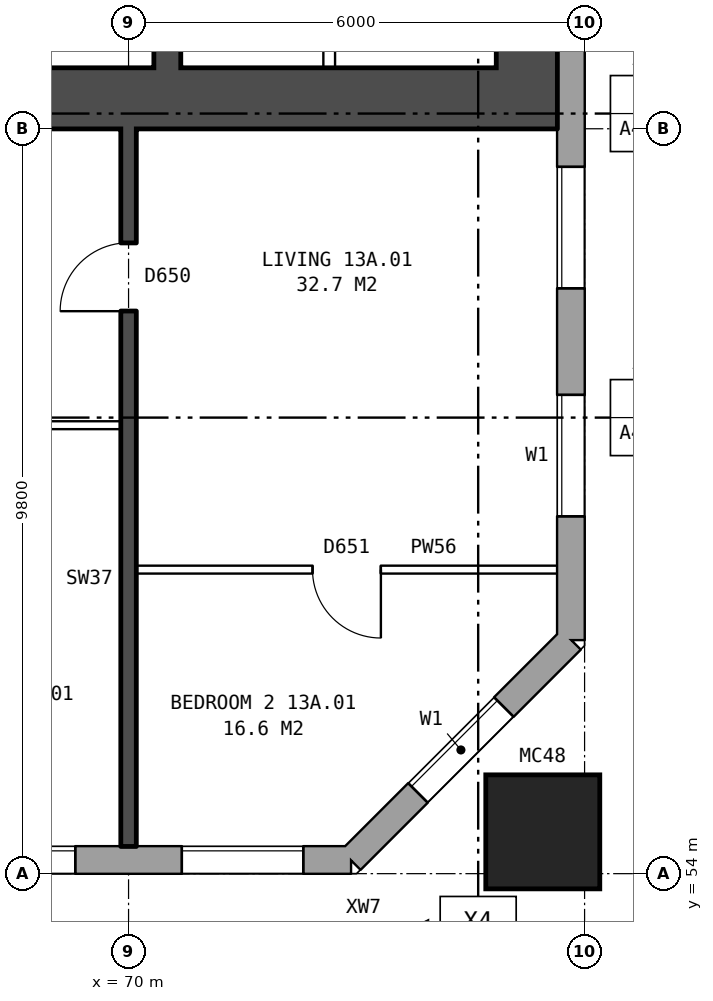
"""IFC4 building model, lengths in metres.
Left out: names, types, materials, properties, quantities, classifications, styles, units other than length and angle.
Written with IfcOpenShell. Run it as: python <this file> out.ifc"""

import sys

from ifc_helpers import new_model, si_unit, direction, frame, frame_2d, origin, origin_2d, place, context, subcontext, project, spatial, rectangle, hollow_rectangle, extrude, element, fill, save


model = new_model("IFC4")
c1 = context("Model", 3, precision=1e-05, world=origin(), true_north=direction((0.0, 1.0)))
c2 = subcontext(c1, "Body", "Model", "MODEL_VIEW")
j1 = project(units=[si_unit("LENGTHUNIT", "METRE"), si_unit("PLANEANGLEUNIT", "RADIAN")], contexts=[c1])
p1 = place(None, origin())
s1 = spatial("IfcSite", under=j1, at=p1, CompositionType="ELEMENT")
p2 = place(p1, origin())
s2 = spatial("IfcBuilding", under=s1, at=p2, CompositionType="ELEMENT")
p3 = place(p2, frame((0.0, 0.0, 50.5)))
s3 = spatial("IfcBuildingStorey", under=s2, at=p3, CompositionType="ELEMENT", Elevation=50.5)
p4 = place(p3, frame((75.45, 54.55, 0.0), z_axis=(0.0, 0.0, 1.0), x_axis=(1.0, 0.0, 0.0)))
e1 = element("IfcColumn", 1, at=p4, inside=s3, PredefinedType="COLUMN", context=c2, shape_type="SweptSolid", body=[
    extrude(hollow_rectangle(XDim=1.5, YDim=1.5, WallThickness=0.08, at=origin_2d()), origin(), (0.0, 0.0, 1.0), 3.1),
])
p5 = place(p3, frame((24.575, 54.18, 0.0), z_axis=(0.0, 0.0, 1.0), x_axis=(1.0, 0.0, 0.0)))
e2 = element("IfcWall", 2, at=p5, inside=s3, PredefinedType="STANDARD", context=c2, shape_type="SweptSolid", body=[
    extrude(rectangle(XDim=48.351, YDim=0.36, at=frame_2d((24.175, 0.0))), origin(), (0.0, 0.0, 1.0), 2.85),
])
p6 = place(p5, frame((1.125, 0.0, 0.8)))
e3 = element("IfcOpeningElement", 3, at=p6, cuts=e2, PredefinedType="OPENING", context=c2, shape_type="SweptSolid", body=[
    extrude(rectangle(XDim=1.6, YDim=1.8, at=frame_2d((0.8, 0.9))), frame((0.0, 0.19, 0.0), z_axis=(0.0, -1.0, 0.0), x_axis=(1.0, 0.0, 0.0)), (0.0, 0.0, 1.0), 0.38),
])
p7 = place(p5, frame((4.125, 0.0, 0.8)))
e4 = element("IfcOpeningElement", 4, at=p7, cuts=e2, PredefinedType="OPENING", context=c2, shape_type="SweptSolid", body=[
    extrude(rectangle(XDim=1.6, YDim=1.8, at=frame_2d((0.8, 0.9))), frame((0.0, 0.19, 0.0), z_axis=(0.0, -1.0, 0.0), x_axis=(1.0, 0.0, 0.0)), (0.0, 0.0, 1.0), 0.38),
])
p8 = place(p5, frame((6.025, 0.0, 0.8)))
e5 = element("IfcOpeningElement", 5, at=p8, cuts=e2, PredefinedType="OPENING", context=c2, shape_type="SweptSolid", body=[
    extrude(rectangle(XDim=1.0, YDim=1.8, at=frame_2d((0.5, 0.9))), frame((0.0, 0.19, 0.0), z_axis=(0.0, -1.0, 0.0), x_axis=(1.0, 0.0, 0.0)), (0.0, 0.0, 1.0), 0.38),
])
p9 = place(p5, frame((9.775, 0.0, 0.8)))
e6 = element("IfcOpeningElement", 6, at=p9, cuts=e2, PredefinedType="OPENING", context=c2, shape_type="SweptSolid", body=[
    extrude(rectangle(XDim=1.0, YDim=0.9, at=frame_2d((0.5, 0.45))), frame((0.0, 0.19, 0.0), z_axis=(0.0, -1.0, 0.0), x_axis=(1.0, 0.0, 0.0)), (0.0, 0.0, 1.0), 0.38),
])
p10 = place(p5, frame((13.125, 0.0, 0.8)))
e7 = element("IfcOpeningElement", 7, at=p10, cuts=e2, PredefinedType="OPENING", context=c2, shape_type="SweptSolid", body=[
    extrude(rectangle(XDim=1.6, YDim=1.8, at=frame_2d((0.8, 0.9))), frame((0.0, 0.19, 0.0), z_axis=(0.0, -1.0, 0.0), x_axis=(1.0, 0.0, 0.0)), (0.0, 0.0, 1.0), 0.38),
])
p11 = place(p5, frame((16.125, 0.0, 0.8)))
e8 = element("IfcOpeningElement", 8, at=p11, cuts=e2, PredefinedType="OPENING", context=c2, shape_type="SweptSolid", body=[
    extrude(rectangle(XDim=1.6, YDim=1.8, at=frame_2d((0.8, 0.9))), frame((0.0, 0.19, 0.0), z_axis=(0.0, -1.0, 0.0), x_axis=(1.0, 0.0, 0.0)), (0.0, 0.0, 1.0), 0.38),
])
p12 = place(p5, frame((19.125, 0.0, 0.8)))
e9 = element("IfcOpeningElement", 9, at=p12, cuts=e2, PredefinedType="OPENING", context=c2, shape_type="SweptSolid", body=[
    extrude(rectangle(XDim=1.6, YDim=1.8, at=frame_2d((0.8, 0.9))), frame((0.0, 0.19, 0.0), z_axis=(0.0, -1.0, 0.0), x_axis=(1.0, 0.0, 0.0)), (0.0, 0.0, 1.0), 0.38),
])
p13 = place(p5, frame((22.125, 0.0, 0.8)))
e10 = element("IfcOpeningElement", 10, at=p13, cuts=e2, PredefinedType="OPENING", context=c2, shape_type="SweptSolid", body=[
    extrude(rectangle(XDim=1.6, YDim=1.8, at=frame_2d((0.8, 0.9))), frame((0.0, 0.19, 0.0), z_axis=(0.0, -1.0, 0.0), x_axis=(1.0, 0.0, 0.0)), (0.0, 0.0, 1.0), 0.38),
])
p14 = place(p5, frame((25.125, 0.0, 0.8)))
e11 = element("IfcOpeningElement", 11, at=p14, cuts=e2, PredefinedType="OPENING", context=c2, shape_type="SweptSolid", body=[
    extrude(rectangle(XDim=1.6, YDim=1.8, at=frame_2d((0.8, 0.9))), frame((0.0, 0.19, 0.0), z_axis=(0.0, -1.0, 0.0), x_axis=(1.0, 0.0, 0.0)), (0.0, 0.0, 1.0), 0.38),
])
p15 = place(p5, frame((28.125, 0.0, 0.8)))
e12 = element("IfcOpeningElement", 12, at=p15, cuts=e2, PredefinedType="OPENING", context=c2, shape_type="SweptSolid", body=[
    extrude(rectangle(XDim=1.6, YDim=1.8, at=frame_2d((0.8, 0.9))), frame((0.0, 0.19, 0.0), z_axis=(0.0, -1.0, 0.0), x_axis=(1.0, 0.0, 0.0)), (0.0, 0.0, 1.0), 0.38),
])
p16 = place(p5, frame((31.125, 0.0, 0.8)))
e13 = element("IfcOpeningElement", 13, at=p16, cuts=e2, PredefinedType="OPENING", context=c2, shape_type="SweptSolid", body=[
    extrude(rectangle(XDim=1.6, YDim=1.8, at=frame_2d((0.8, 0.9))), frame((0.0, 0.19, 0.0), z_axis=(0.0, -1.0, 0.0), x_axis=(1.0, 0.0, 0.0)), (0.0, 0.0, 1.0), 0.38),
])
p17 = place(p5, frame((34.125, 0.0, 0.8)))
e14 = element("IfcOpeningElement", 14, at=p17, cuts=e2, PredefinedType="OPENING", context=c2, shape_type="SweptSolid", body=[
    extrude(rectangle(XDim=1.6, YDim=1.8, at=frame_2d((0.8, 0.9))), frame((0.0, 0.19, 0.0), z_axis=(0.0, -1.0, 0.0), x_axis=(1.0, 0.0, 0.0)), (0.0, 0.0, 1.0), 0.38),
])
p18 = place(p5, frame((36.575, 0.0, 0.45)))
e15 = element("IfcOpeningElement", 15, at=p18, cuts=e2, PredefinedType="OPENING", context=c2, shape_type="SweptSolid", body=[
    extrude(rectangle(XDim=1.2, YDim=1.8, at=frame_2d((0.6, 0.9))), frame((0.0, 0.19, 0.0), z_axis=(0.0, -1.0, 0.0), x_axis=(1.0, 0.0, 0.0)), (0.0, 0.0, 1.0), 0.38),
])
p19 = place(p5, frame((39.975, 0.0, 1.7)))
e16 = element("IfcOpeningElement", 16, at=p19, cuts=e2, PredefinedType="OPENING", context=c2, shape_type="SweptSolid", body=[
    extrude(rectangle(XDim=1.0, YDim=0.9, at=frame_2d((0.5, 0.45))), frame((0.0, 0.19, 0.0), z_axis=(0.0, -1.0, 0.0), x_axis=(1.0, 0.0, 0.0)), (0.0, 0.0, 1.0), 0.38),
])
p20 = place(p5, frame((43.125, 0.0, 0.8)))
e17 = element("IfcOpeningElement", 17, at=p20, cuts=e2, PredefinedType="OPENING", context=c2, shape_type="SweptSolid", body=[
    extrude(rectangle(XDim=1.6, YDim=1.8, at=frame_2d((0.8, 0.9))), frame((0.0, 0.19, 0.0), z_axis=(0.0, -1.0, 0.0), x_axis=(1.0, 0.0, 0.0)), (0.0, 0.0, 1.0), 0.38),
])
p21 = place(p5, frame((46.125, 0.0, 0.8)))
e18 = element("IfcOpeningElement", 18, at=p21, cuts=e2, PredefinedType="OPENING", context=c2, shape_type="SweptSolid", body=[
    extrude(rectangle(XDim=1.6, YDim=1.8, at=frame_2d((0.8, 0.9))), frame((0.0, 0.19, 0.0), z_axis=(0.0, -1.0, 0.0), x_axis=(1.0, 0.0, 0.0)), (0.0, 0.0, 1.0), 0.38),
])
p22 = place(p5, frame((7.325, 0.0, 1.7)))
e19 = element("IfcOpeningElement", 19, at=p22, cuts=e2, PredefinedType="OPENING", context=c2, shape_type="SweptSolid", body=[
    extrude(rectangle(XDim=1.0, YDim=0.9, at=frame_2d((0.5, 0.45))), frame((0.0, 0.19, 0.0), z_axis=(0.0, -1.0, 0.0), x_axis=(1.0, 0.0, 0.0)), (0.0, 0.0, 1.0), 0.38),
])
p23 = place(p5, frame((11.075, 0.0, 0.8)))
e20 = element("IfcOpeningElement", 20, at=p23, cuts=e2, PredefinedType="OPENING", context=c2, shape_type="SweptSolid", body=[
    extrude(rectangle(XDim=1.0, YDim=1.8, at=frame_2d((0.5, 0.9))), frame((0.0, 0.19, 0.0), z_axis=(0.0, -1.0, 0.0), x_axis=(1.0, 0.0, 0.0)), (0.0, 0.0, 1.0), 0.38),
])
p24 = place(p5, frame((38.075, 0.0, 0.45)))
e21 = element("IfcOpeningElement", 21, at=p24, cuts=e2, PredefinedType="OPENING", context=c2, shape_type="SweptSolid", body=[
    extrude(rectangle(XDim=1.0, YDim=0.9, at=frame_2d((0.5, 0.45))), frame((0.0, 0.19, 0.0), z_axis=(0.0, -1.0, 0.0), x_axis=(1.0, 0.0, 0.0)), (0.0, 0.0, 1.0), 0.38),
])
p25 = place(p5, frame((41.275, 0.0, 0.8)))
e22 = element("IfcOpeningElement", 22, at=p25, cuts=e2, PredefinedType="OPENING", context=c2, shape_type="SweptSolid", body=[
    extrude(rectangle(XDim=1.4, YDim=1.8, at=frame_2d((0.7, 0.9))), frame((0.0, 0.19, 0.0), z_axis=(0.0, -1.0, 0.0), x_axis=(1.0, 0.0, 0.0)), (0.0, 0.0, 1.0), 0.38),
])
p26 = place(p3, frame((72.925, 54.18, 0.0), z_axis=(0.0, 0.0, 1.0), x_axis=(0.707106781187, 0.707106781187, 0.0)))
e23 = element("IfcWall", 23, at=p26, inside=s3, PredefinedType="STANDARD", context=c2, shape_type="SweptSolid", body=[
    extrude(rectangle(XDim=4.094, YDim=0.36, at=frame_2d((2.047, 0.0))), origin(), (0.0, 0.0, 1.0), 2.85),
])
p27 = place(p26, frame((1.247, 0.0, 0.8)))
e24 = element("IfcOpeningElement", 24, at=p27, cuts=e23, PredefinedType="OPENING", context=c2, shape_type="SweptSolid", body=[
    extrude(rectangle(XDim=1.6, YDim=1.8, at=frame_2d((0.8, 0.9))), frame((0.0, 0.19, 0.0), z_axis=(0.0, -1.0, 0.0), x_axis=(1.0, 0.0, 0.0)), (0.0, 0.0, 1.0), 0.38),
])
p28 = place(p3, frame((75.82, 57.075, 0.0), z_axis=(0.0, 0.0, 1.0), x_axis=(0.0, 1.0, 0.0)))
e25 = element("IfcWall", 25, at=p28, inside=s3, PredefinedType="STANDARD", context=c2, shape_type="SweptSolid", body=[
    extrude(rectangle(XDim=25.851, YDim=0.36, at=frame_2d((12.925, 0.0))), origin(), (0.0, 0.0, 1.0), 2.85),
])
p29 = place(p28, frame((1.625, 0.0, 0.8)))
e26 = element("IfcOpeningElement", 26, at=p29, cuts=e25, PredefinedType="OPENING", context=c2, shape_type="SweptSolid", body=[
    extrude(rectangle(XDim=1.6, YDim=1.8, at=frame_2d((0.8, 0.9))), frame((0.0, 0.19, 0.0), z_axis=(0.0, -1.0, 0.0), x_axis=(1.0, 0.0, 0.0)), (0.0, 0.0, 1.0), 0.38),
])
p30 = place(p28, frame((4.625, 0.0, 0.8)))
e27 = element("IfcOpeningElement", 27, at=p30, cuts=e25, PredefinedType="OPENING", context=c2, shape_type="SweptSolid", body=[
    extrude(rectangle(XDim=1.6, YDim=1.8, at=frame_2d((0.8, 0.9))), frame((0.0, 0.19, 0.0), z_axis=(0.0, -1.0, 0.0), x_axis=(1.0, 0.0, 0.0)), (0.0, 0.0, 1.0), 0.38),
])
p31 = place(p28, frame((19.625, 0.0, 0.8)))
e28 = element("IfcOpeningElement", 28, at=p31, cuts=e25, PredefinedType="OPENING", context=c2, shape_type="SweptSolid", body=[
    extrude(rectangle(XDim=1.6, YDim=1.8, at=frame_2d((0.8, 0.9))), frame((0.0, 0.19, 0.0), z_axis=(0.0, -1.0, 0.0), x_axis=(1.0, 0.0, 0.0)), (0.0, 0.0, 1.0), 0.38),
])
p32 = place(p28, frame((22.625, 0.0, 0.8)))
e29 = element("IfcOpeningElement", 29, at=p32, cuts=e25, PredefinedType="OPENING", context=c2, shape_type="SweptSolid", body=[
    extrude(rectangle(XDim=1.6, YDim=1.8, at=frame_2d((0.8, 0.9))), frame((0.0, 0.19, 0.0), z_axis=(0.0, -1.0, 0.0), x_axis=(1.0, 0.0, 0.0)), (0.0, 0.0, 1.0), 0.38),
])
p33 = place(p3, frame((75.24, 64.6, 0.0), z_axis=(0.0, 0.0, 1.0), x_axis=(0.0, 1.0, 0.0)))
e30 = element("IfcWall", 30, at=p33, inside=s3, PredefinedType="SHEAR", context=c2, shape_type="SweptSolid", body=[
    extrude(rectangle(XDim=10.8, YDim=0.8, at=frame_2d((5.4, 0.0))), origin(), (0.0, 0.0, 1.0), 2.85),
])
p34 = place(p3, frame((66.64, 64.2, 0.0), z_axis=(0.0, 0.0, 1.0), x_axis=(1.0, 0.0, 0.0)))
e31 = element("IfcWall", 31, at=p34, inside=s3, PredefinedType="SHEAR", context=c2, shape_type="SweptSolid", body=[
    extrude(rectangle(XDim=9.0, YDim=0.8, at=frame_2d((4.5, 0.0))), origin(), (0.0, 0.0, 1.0), 2.85),
])
p35 = place(p3, frame((70.51, 64.6, 0.0), z_axis=(0.0, 0.0, 1.0), x_axis=(0.0, 1.0, 0.0)))
e32 = element("IfcWall", 32, at=p35, inside=s3, PredefinedType="SHEAR", context=c2, shape_type="SweptSolid", body=[
    extrude(rectangle(XDim=2.075, YDim=0.35, at=frame_2d((1.038, 0.0))), origin(), (0.0, 0.0, 1.0), 2.85),
])
p36 = place(p3, frame((72.64, 64.6, 0.0), z_axis=(0.0, 0.0, 1.0), x_axis=(0.0, 1.0, 0.0)))
e33 = element("IfcWall", 33, at=p36, inside=s3, PredefinedType="PARTITIONING", context=c2, shape_type="SweptSolid", body=[
    extrude(rectangle(XDim=1.575, YDim=0.15, at=frame_2d((0.788, 0.0))), origin(), (0.0, 0.0, 1.0), 2.85),
])
p37 = place(p36, frame((0.363, 0.0, 0.0)))
e34 = element("IfcOpeningElement", 34, at=p37, cuts=e33, PredefinedType="OPENING", context=c2, shape_type="SweptSolid", body=[
    extrude(rectangle(XDim=0.85, YDim=2.1, at=frame_2d((0.425, 1.05))), frame((0.0, 0.085, 0.0), z_axis=(0.0, -1.0, 0.0), x_axis=(1.0, 0.0, 0.0)), (0.0, 0.0, 1.0), 0.17),
])
p38 = place(p3, frame((70.1, 58.0, 0.0), z_axis=(0.0, 0.0, 1.0), x_axis=(1.0, 0.0, 0.0)))
e35 = element("IfcWall", 35, at=p38, inside=s3, PredefinedType="PARTITIONING", context=c2, shape_type="SweptSolid", body=[
    extrude(rectangle(XDim=5.54, YDim=0.1, at=frame_2d((2.77, 0.0))), origin(), (0.0, 0.0, 1.0), 2.85),
])
p39 = place(p38, frame((2.32, 0.0, 0.0)))
e36 = element("IfcOpeningElement", 36, at=p39, cuts=e35, PredefinedType="OPENING", context=c2, shape_type="SweptSolid", body=[
    extrude(rectangle(XDim=0.9, YDim=2.1, at=frame_2d((0.45, 1.05))), frame((0.0, 0.06, 0.0), z_axis=(0.0, -1.0, 0.0), x_axis=(1.0, 0.0, 0.0)), (0.0, 0.0, 1.0), 0.12),
])
p40 = place(p3, frame((64.1, 59.9, 0.0), z_axis=(0.0, 0.0, 1.0), x_axis=(1.0, 0.0, 0.0)))
e37 = element("IfcWall", 37, at=p40, inside=s3, PredefinedType="PARTITIONING", context=c2, shape_type="SweptSolid", body=[
    extrude(rectangle(XDim=5.8, YDim=0.1, at=frame_2d((2.9, 0.0))), origin(), (0.0, 0.0, 1.0), 2.85),
])
p41 = place(p40, frame((3.6, 0.0, 0.0)))
e38 = element("IfcOpeningElement", 38, at=p41, cuts=e37, PredefinedType="OPENING", context=c2, shape_type="SweptSolid", body=[
    extrude(rectangle(XDim=0.9, YDim=2.1, at=frame_2d((0.45, 1.05))), frame((0.0, 0.06, 0.0), z_axis=(0.0, -1.0, 0.0), x_axis=(1.0, 0.0, 0.0)), (0.0, 0.0, 1.0), 0.12),
])
p42 = place(p40, frame((0.7, 0.0, 0.0)))
e39 = element("IfcOpeningElement", 39, at=p42, cuts=e37, PredefinedType="OPENING", context=c2, shape_type="SweptSolid", body=[
    extrude(rectangle(XDim=0.9, YDim=2.1, at=frame_2d((0.45, 1.05))), frame((0.0, 0.06, 0.0), z_axis=(0.0, -1.0, 0.0), x_axis=(1.0, 0.0, 0.0)), (0.0, 0.0, 1.0), 0.12),
])
p43 = place(p3, frame((70.0, 54.36, 0.0), z_axis=(0.0, 0.0, 1.0), x_axis=(0.0, 1.0, 0.0)))
e40 = element("IfcWall", 40, at=p43, inside=s3, PredefinedType="SOLIDWALL", context=c2, shape_type="SweptSolid", body=[
    extrude(rectangle(XDim=9.44, YDim=0.2, at=frame_2d((4.72, 0.0))), origin(), (0.0, 0.0, 1.0), 2.85),
])
p44 = place(p43, frame((7.04, 0.0, 0.0)))
e41 = element("IfcOpeningElement", 41, at=p44, cuts=e40, PredefinedType="OPENING", context=c2, shape_type="SweptSolid", body=[
    extrude(rectangle(XDim=0.9, YDim=2.1, at=frame_2d((0.45, 1.05))), frame((0.0, 0.11, 0.0), z_axis=(0.0, -1.0, 0.0), x_axis=(1.0, 0.0, 0.0)), (0.0, 0.0, 1.0), 0.22),
])
p45 = place(p20, origin())
e42 = element("IfcWindow", 42, at=p45, inside=s3, PartitioningType="SINGLE_PANEL", PredefinedType="WINDOW", context=c2, shape_type="SweptSolid", body=[
    extrude(rectangle(XDim=1.6, YDim=1.8, at=frame_2d((0.8, 0.9))), frame((0.0, 0.15, 0.0), z_axis=(0.0, -1.0, 0.0), x_axis=(1.0, 0.0, 0.0)), (0.0, 0.0, 1.0), 0.06),
])
fill(e17, e42)
p46 = place(p21, origin())
e43 = element("IfcWindow", 43, at=p46, inside=s3, PartitioningType="SINGLE_PANEL", PredefinedType="WINDOW", context=c2, shape_type="SweptSolid", body=[
    extrude(rectangle(XDim=1.6, YDim=1.8, at=frame_2d((0.8, 0.9))), frame((0.0, 0.15, 0.0), z_axis=(0.0, -1.0, 0.0), x_axis=(1.0, 0.0, 0.0)), (0.0, 0.0, 1.0), 0.06),
])
fill(e18, e43)
p47 = place(p27, origin())
e44 = element("IfcWindow", 44, at=p47, inside=s3, PartitioningType="SINGLE_PANEL", PredefinedType="WINDOW", context=c2, shape_type="SweptSolid", body=[
    extrude(rectangle(XDim=1.6, YDim=1.8, at=frame_2d((0.8, 0.9))), frame((0.0, 0.15, 0.0), z_axis=(0.0, -1.0, 0.0), x_axis=(1.0, 0.0, 0.0)), (0.0, 0.0, 1.0), 0.06),
])
fill(e24, e44)
p48 = place(p29, origin())
e45 = element("IfcWindow", 45, at=p48, inside=s3, PartitioningType="SINGLE_PANEL", PredefinedType="WINDOW", context=c2, shape_type="SweptSolid", body=[
    extrude(rectangle(XDim=1.6, YDim=1.8, at=frame_2d((0.8, 0.9))), frame((0.0, 0.15, 0.0), z_axis=(0.0, -1.0, 0.0), x_axis=(1.0, 0.0, 0.0)), (0.0, 0.0, 1.0), 0.06),
])
fill(e26, e45)
p49 = place(p30, origin())
e46 = element("IfcWindow", 46, at=p49, inside=s3, PartitioningType="SINGLE_PANEL", PredefinedType="WINDOW", context=c2, shape_type="SweptSolid", body=[
    extrude(rectangle(XDim=1.6, YDim=1.8, at=frame_2d((0.8, 0.9))), frame((0.0, 0.15, 0.0), z_axis=(0.0, -1.0, 0.0), x_axis=(1.0, 0.0, 0.0)), (0.0, 0.0, 1.0), 0.06),
])
fill(e27, e46)
p50 = place(p39, frame((0.9, 0.0, 0.0), z_axis=(0.0, 0.0, 1.0), x_axis=(-1.0, 0.0, 0.0)))
e47 = element("IfcDoor", 47, at=p50, inside=s3, OperationType="SINGLE_SWING_LEFT", PredefinedType="DOOR", context=c2, shape_type="SweptSolid", body=[
    extrude(rectangle(XDim=0.9, YDim=2.1, at=frame_2d((0.45, 1.05))), frame((0.0, 0.025, 0.0), z_axis=(0.0, -1.0, 0.0), x_axis=(1.0, 0.0, 0.0)), (0.0, 0.0, 1.0), 0.05),
])
fill(e36, e47)
p51 = place(p44, origin())
e48 = element("IfcDoor", 48, at=p51, inside=s3, OperationType="SINGLE_SWING_LEFT", PredefinedType="DOOR", context=c2, shape_type="SweptSolid", body=[
    extrude(rectangle(XDim=0.9, YDim=2.1, at=frame_2d((0.45, 1.05))), frame((0.0, 0.025, 0.0), z_axis=(0.0, -1.0, 0.0), x_axis=(1.0, 0.0, 0.0)), (0.0, 0.0, 1.0), 0.05),
])
fill(e41, e48)
save(model, sys.argv[1])
